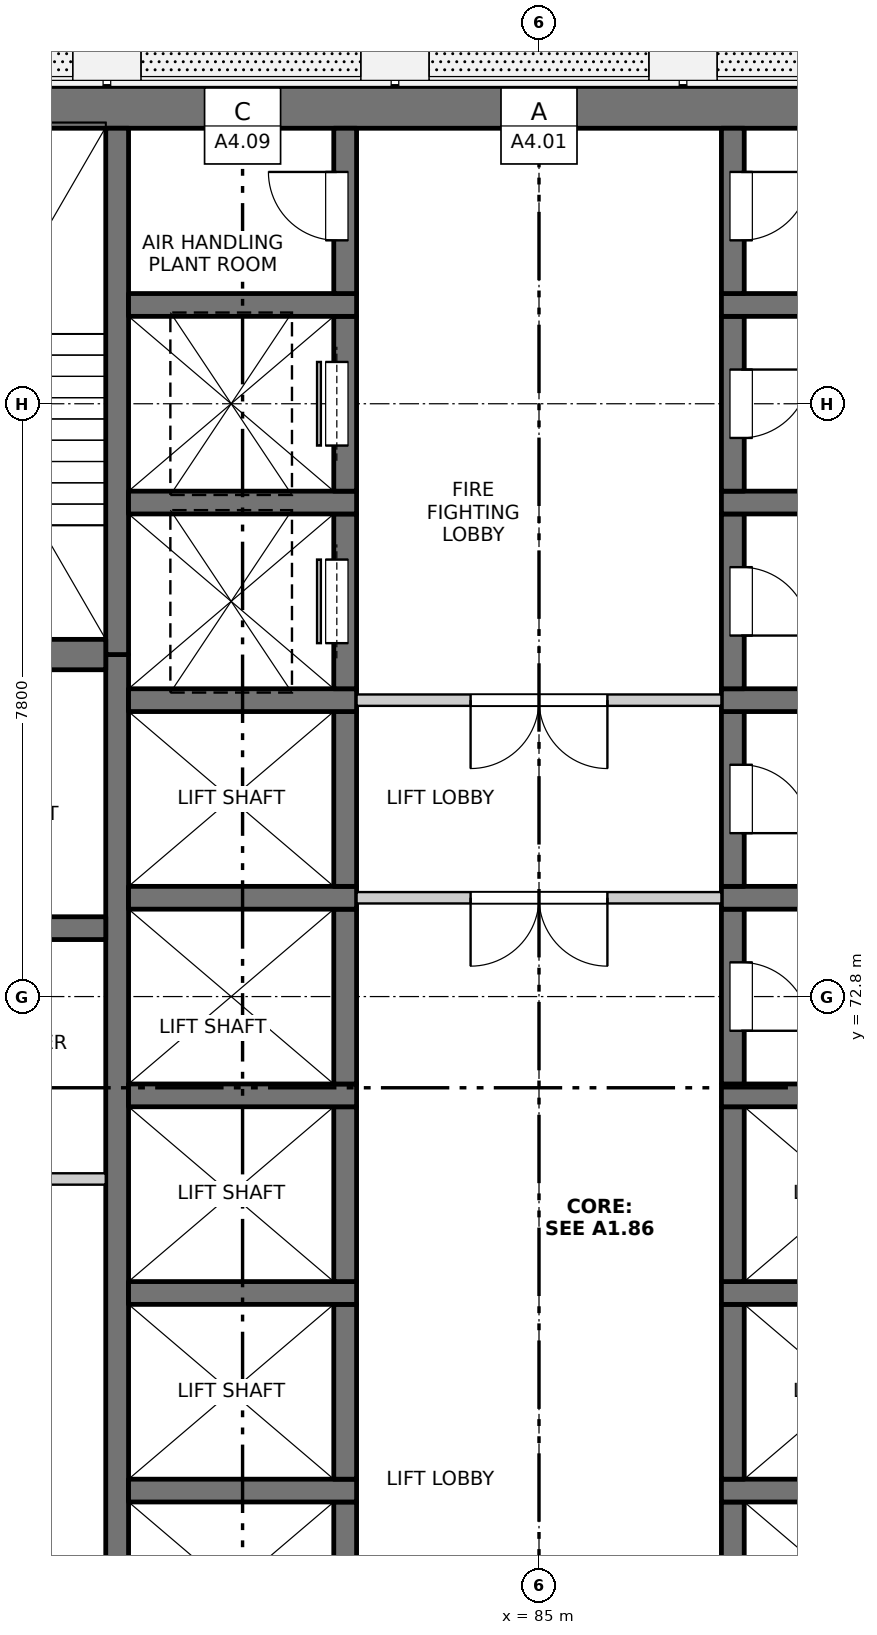
"""IFC4 building model, lengths in metres.
Left out: names, types, materials, properties, quantities, classifications, styles, units other than length and angle.
Written with IfcOpenShell. Run it as: python <this file> out.ifc"""

import sys

from ifc_helpers import new_model, si_unit, direction, frame, frame_2d, origin, place, context, subcontext, project, spatial, rectangle, extrude, element, fill, save


model = new_model("IFC4")
c1 = context("Model", 3, precision=1e-05, world=origin(), true_north=direction((0.0, 1.0)))
c2 = subcontext(c1, "Body", "Model", "MODEL_VIEW")
j1 = project(units=[si_unit("LENGTHUNIT", "METRE"), si_unit("PLANEANGLEUNIT", "RADIAN")], contexts=[c1])
p1 = place(None, origin())
s1 = spatial("IfcSite", under=j1, at=p1, CompositionType="ELEMENT")
p2 = place(p1, origin())
s2 = spatial("IfcBuilding", under=s1, at=p2, CompositionType="ELEMENT")
p3 = place(p2, frame((0.0, 0.0, 116.9)))
s3 = spatial("IfcBuildingStorey", under=s2, at=p3, CompositionType="ELEMENT", Elevation=116.9)
p4 = place(p3, frame((75.525, 84.5, -0.3), z_axis=(0.0, 0.0, 1.0), x_axis=(1.0, 0.0, 0.0)))
e1 = element("IfcWall", 1, at=p4, inside=s3, PredefinedType="SOLIDWALL", context=c2, shape_type="SweptSolid", body=[
    extrude(rectangle(XDim=18.95, YDim=0.55, at=frame_2d((9.475, 0.0))), origin(), (0.0, 0.0, 1.0), 6.8),
])
p5 = place(p3, frame((79.45, 60.95, -0.3), z_axis=(0.0, 0.0, 1.0), x_axis=(0.0, 1.0, 0.0)))
e2 = element("IfcWall", 2, at=p5, inside=s3, PredefinedType="SOLIDWALL", context=c2, shape_type="SweptSolid", body=[
    extrude(rectangle(XDim=16.35, YDim=0.3, at=frame_2d((8.175, 0.0))), origin(), (0.0, 0.0, 1.0), 6.8),
])
p6 = place(p3, frame((79.45, 77.3, -0.3), z_axis=(0.0, 0.0, 1.0), x_axis=(0.0, 1.0, 0.0)))
e3 = element("IfcWall", 3, at=p6, inside=s3, PredefinedType="SOLIDWALL", context=c2, shape_type="SweptSolid", body=[
    extrude(rectangle(XDim=6.925, YDim=0.3, at=frame_2d((3.462, 0.0))), origin(), (0.0, 0.0, 1.0), 6.8),
])
p7 = place(p3, frame((82.45, 63.85, -0.3), z_axis=(0.0, 0.0, 1.0), x_axis=(0.0, 1.0, 0.0)))
e4 = element("IfcWall", 4, at=p7, inside=s3, PredefinedType="SOLIDWALL", context=c2, shape_type="SweptSolid", body=[
    extrude(rectangle(XDim=2.3, YDim=0.3, at=frame_2d((1.15, 0.0))), origin(), (0.0, 0.0, 1.0), 6.8),
])
p8 = place(p3, frame((79.6, 66.3, -0.3), z_axis=(0.0, 0.0, 1.0), x_axis=(1.0, 0.0, 0.0)))
e5 = element("IfcWall", 5, at=p8, inside=s3, PredefinedType="SOLIDWALL", context=c2, shape_type="SweptSolid", body=[
    extrude(rectangle(XDim=3.0, YDim=0.3, at=frame_2d((1.5, 0.0))), origin(), (0.0, 0.0, 1.0), 6.8),
])
p9 = place(p3, frame((82.45, 66.45, -0.3), z_axis=(0.0, 0.0, 1.0), x_axis=(0.0, 1.0, 0.0)))
e6 = element("IfcWall", 6, at=p9, inside=s3, PredefinedType="SOLIDWALL", context=c2, shape_type="SweptSolid", body=[
    extrude(rectangle(XDim=2.3, YDim=0.3, at=frame_2d((1.15, 0.0))), origin(), (0.0, 0.0, 1.0), 6.8),
])
p10 = place(p3, frame((79.6, 68.9, -0.3), z_axis=(0.0, 0.0, 1.0), x_axis=(1.0, 0.0, 0.0)))
e7 = element("IfcWall", 7, at=p10, inside=s3, PredefinedType="SOLIDWALL", context=c2, shape_type="SweptSolid", body=[
    extrude(rectangle(XDim=3.0, YDim=0.3, at=frame_2d((1.5, 0.0))), origin(), (0.0, 0.0, 1.0), 6.8),
])
p11 = place(p3, frame((82.45, 69.05, -0.3), z_axis=(0.0, 0.0, 1.0), x_axis=(0.0, 1.0, 0.0)))
e8 = element("IfcWall", 8, at=p11, inside=s3, PredefinedType="SOLIDWALL", context=c2, shape_type="SweptSolid", body=[
    extrude(rectangle(XDim=2.3, YDim=0.3, at=frame_2d((1.15, 0.0))), origin(), (0.0, 0.0, 1.0), 6.8),
])
p12 = place(p3, frame((79.6, 71.5, -0.3), z_axis=(0.0, 0.0, 1.0), x_axis=(1.0, 0.0, 0.0)))
e9 = element("IfcWall", 9, at=p12, inside=s3, PredefinedType="SOLIDWALL", context=c2, shape_type="SweptSolid", body=[
    extrude(rectangle(XDim=3.0, YDim=0.3, at=frame_2d((1.5, 0.0))), origin(), (0.0, 0.0, 1.0), 6.8),
])
p13 = place(p3, frame((82.45, 71.65, -0.3), z_axis=(0.0, 0.0, 1.0), x_axis=(0.0, 1.0, 0.0)))
e10 = element("IfcWall", 10, at=p13, inside=s3, PredefinedType="SOLIDWALL", context=c2, shape_type="SweptSolid", body=[
    extrude(rectangle(XDim=2.3, YDim=0.3, at=frame_2d((1.15, 0.0))), origin(), (0.0, 0.0, 1.0), 6.8),
])
p14 = place(p3, frame((79.6, 74.1, -0.3), z_axis=(0.0, 0.0, 1.0), x_axis=(1.0, 0.0, 0.0)))
e11 = element("IfcWall", 11, at=p14, inside=s3, PredefinedType="SOLIDWALL", context=c2, shape_type="SweptSolid", body=[
    extrude(rectangle(XDim=3.0, YDim=0.3, at=frame_2d((1.5, 0.0))), origin(), (0.0, 0.0, 1.0), 6.8),
])
p15 = place(p3, frame((82.45, 74.25, -0.3), z_axis=(0.0, 0.0, 1.0), x_axis=(0.0, 1.0, 0.0)))
e12 = element("IfcWall", 12, at=p15, inside=s3, PredefinedType="SOLIDWALL", context=c2, shape_type="SweptSolid", body=[
    extrude(rectangle(XDim=2.3, YDim=0.3, at=frame_2d((1.15, 0.0))), origin(), (0.0, 0.0, 1.0), 6.8),
])
p16 = place(p3, frame((79.6, 76.7, -0.3), z_axis=(0.0, 0.0, 1.0), x_axis=(1.0, 0.0, 0.0)))
e13 = element("IfcWall", 13, at=p16, inside=s3, PredefinedType="SOLIDWALL", context=c2, shape_type="SweptSolid", body=[
    extrude(rectangle(XDim=3.0, YDim=0.3, at=frame_2d((1.5, 0.0))), origin(), (0.0, 0.0, 1.0), 6.8),
])
p17 = place(p3, frame((82.45, 76.85, -0.3), z_axis=(0.0, 0.0, 1.0), x_axis=(0.0, 1.0, 0.0)))
e14 = element("IfcWall", 14, at=p17, inside=s3, PredefinedType="SOLIDWALL", context=c2, shape_type="SweptSolid", body=[
    extrude(rectangle(XDim=2.3, YDim=0.3, at=frame_2d((1.15, 0.0))), origin(), (0.0, 0.0, 1.0), 6.8),
])
p18 = place(p17, frame((0.6, 0.0, 0.3)))
e15 = element("IfcOpeningElement", 15, at=p18, cuts=e14, PredefinedType="OPENING", context=c2, shape_type="SweptSolid", body=[
    extrude(rectangle(XDim=1.1, YDim=2.1, at=frame_2d((0.55, 1.05))), frame((0.0, 0.16, 0.0), z_axis=(0.0, -1.0, 0.0), x_axis=(1.0, 0.0, 0.0)), (0.0, 0.0, 1.0), 0.32),
])
p19 = place(p3, frame((79.6, 79.3, -0.3), z_axis=(0.0, 0.0, 1.0), x_axis=(1.0, 0.0, 0.0)))
e16 = element("IfcWall", 16, at=p19, inside=s3, PredefinedType="SOLIDWALL", context=c2, shape_type="SweptSolid", body=[
    extrude(rectangle(XDim=3.0, YDim=0.3, at=frame_2d((1.5, 0.0))), origin(), (0.0, 0.0, 1.0), 6.8),
])
p20 = place(p3, frame((82.45, 79.45, -0.3), z_axis=(0.0, 0.0, 1.0), x_axis=(0.0, 1.0, 0.0)))
e17 = element("IfcWall", 17, at=p20, inside=s3, PredefinedType="SOLIDWALL", context=c2, shape_type="SweptSolid", body=[
    extrude(rectangle(XDim=2.3, YDim=0.3, at=frame_2d((1.15, 0.0))), origin(), (0.0, 0.0, 1.0), 6.8),
])
p21 = place(p20, frame((0.6, 0.0, 0.3)))
e18 = element("IfcOpeningElement", 18, at=p21, cuts=e17, PredefinedType="OPENING", context=c2, shape_type="SweptSolid", body=[
    extrude(rectangle(XDim=1.1, YDim=2.1, at=frame_2d((0.55, 1.05))), frame((0.0, 0.16, 0.0), z_axis=(0.0, -1.0, 0.0), x_axis=(1.0, 0.0, 0.0)), (0.0, 0.0, 1.0), 0.32),
])
p22 = place(p3, frame((79.6, 81.9, -0.3), z_axis=(0.0, 0.0, 1.0), x_axis=(1.0, 0.0, 0.0)))
e19 = element("IfcWall", 19, at=p22, inside=s3, PredefinedType="SOLIDWALL", context=c2, shape_type="SweptSolid", body=[
    extrude(rectangle(XDim=3.0, YDim=0.3, at=frame_2d((1.5, 0.0))), origin(), (0.0, 0.0, 1.0), 6.8),
])
p23 = place(p3, frame((82.45, 82.05, -0.3), z_axis=(0.0, 0.0, 1.0), x_axis=(0.0, 1.0, 0.0)))
e20 = element("IfcWall", 20, at=p23, inside=s3, PredefinedType="SOLIDWALL", context=c2, shape_type="SweptSolid", body=[
    extrude(rectangle(XDim=2.175, YDim=0.3, at=frame_2d((1.087, 0.0))), origin(), (0.0, 0.0, 1.0), 6.8),
])
p24 = place(p23, frame((0.7, 0.0, 0.3)))
e21 = element("IfcOpeningElement", 21, at=p24, cuts=e20, PredefinedType="OPENING", context=c2, shape_type="SweptSolid", body=[
    extrude(rectangle(XDim=0.9, YDim=2.1, at=frame_2d((0.45, 1.05))), frame((0.0, 0.16, 0.0), z_axis=(0.0, -1.0, 0.0), x_axis=(1.0, 0.0, 0.0)), (0.0, 0.0, 1.0), 0.32),
])
p25 = place(p3, frame((87.55, 63.85, -0.3), z_axis=(0.0, 0.0, 1.0), x_axis=(0.0, 1.0, 0.0)))
e22 = element("IfcWall", 22, at=p25, inside=s3, PredefinedType="SOLIDWALL", context=c2, shape_type="SweptSolid", body=[
    extrude(rectangle(XDim=2.3, YDim=0.3, at=frame_2d((1.15, 0.0))), origin(), (0.0, 0.0, 1.0), 6.8),
])
p26 = place(p3, frame((87.4, 66.3, -0.3), z_axis=(0.0, 0.0, 1.0), x_axis=(1.0, 0.0, 0.0)))
e23 = element("IfcWall", 23, at=p26, inside=s3, PredefinedType="SOLIDWALL", context=c2, shape_type="SweptSolid", body=[
    extrude(rectangle(XDim=3.0, YDim=0.3, at=frame_2d((1.5, 0.0))), origin(), (0.0, 0.0, 1.0), 6.8),
])
p27 = place(p3, frame((87.55, 66.45, -0.3), z_axis=(0.0, 0.0, 1.0), x_axis=(0.0, 1.0, 0.0)))
e24 = element("IfcWall", 24, at=p27, inside=s3, PredefinedType="SOLIDWALL", context=c2, shape_type="SweptSolid", body=[
    extrude(rectangle(XDim=2.3, YDim=0.3, at=frame_2d((1.15, 0.0))), origin(), (0.0, 0.0, 1.0), 6.8),
])
p28 = place(p3, frame((87.4, 68.9, -0.3), z_axis=(0.0, 0.0, 1.0), x_axis=(1.0, 0.0, 0.0)))
e25 = element("IfcWall", 25, at=p28, inside=s3, PredefinedType="SOLIDWALL", context=c2, shape_type="SweptSolid", body=[
    extrude(rectangle(XDim=3.0, YDim=0.3, at=frame_2d((1.5, 0.0))), origin(), (0.0, 0.0, 1.0), 6.8),
])
p29 = place(p3, frame((87.55, 69.05, -0.3), z_axis=(0.0, 0.0, 1.0), x_axis=(0.0, 1.0, 0.0)))
e26 = element("IfcWall", 26, at=p29, inside=s3, PredefinedType="SOLIDWALL", context=c2, shape_type="SweptSolid", body=[
    extrude(rectangle(XDim=2.3, YDim=0.3, at=frame_2d((1.15, 0.0))), origin(), (0.0, 0.0, 1.0), 6.8),
])
p30 = place(p3, frame((87.4, 71.5, -0.3), z_axis=(0.0, 0.0, 1.0), x_axis=(1.0, 0.0, 0.0)))
e27 = element("IfcWall", 27, at=p30, inside=s3, PredefinedType="SOLIDWALL", context=c2, shape_type="SweptSolid", body=[
    extrude(rectangle(XDim=3.0, YDim=0.3, at=frame_2d((1.5, 0.0))), origin(), (0.0, 0.0, 1.0), 6.8),
])
p31 = place(p3, frame((87.55, 71.65, -0.3), z_axis=(0.0, 0.0, 1.0), x_axis=(0.0, 1.0, 0.0)))
e28 = element("IfcWall", 28, at=p31, inside=s3, PredefinedType="SOLIDWALL", context=c2, shape_type="SweptSolid", body=[
    extrude(rectangle(XDim=2.3, YDim=0.3, at=frame_2d((1.15, 0.0))), origin(), (0.0, 0.0, 1.0), 6.8),
])
p32 = place(p31, frame((0.7, 0.0, 0.3)))
e29 = element("IfcOpeningElement", 29, at=p32, cuts=e28, PredefinedType="OPENING", context=c2, shape_type="SweptSolid", body=[
    extrude(rectangle(XDim=0.9, YDim=2.1, at=frame_2d((0.45, 1.05))), frame((0.0, 0.16, 0.0), z_axis=(0.0, -1.0, 0.0), x_axis=(1.0, 0.0, 0.0)), (0.0, 0.0, 1.0), 0.32),
])
p33 = place(p3, frame((87.4, 74.1, -0.3), z_axis=(0.0, 0.0, 1.0), x_axis=(1.0, 0.0, 0.0)))
e30 = element("IfcWall", 30, at=p33, inside=s3, PredefinedType="SOLIDWALL", context=c2, shape_type="SweptSolid", body=[
    extrude(rectangle(XDim=3.0, YDim=0.3, at=frame_2d((1.5, 0.0))), origin(), (0.0, 0.0, 1.0), 6.8),
])
p34 = place(p3, frame((87.55, 74.25, -0.3), z_axis=(0.0, 0.0, 1.0), x_axis=(0.0, 1.0, 0.0)))
e31 = element("IfcWall", 31, at=p34, inside=s3, PredefinedType="SOLIDWALL", context=c2, shape_type="SweptSolid", body=[
    extrude(rectangle(XDim=2.3, YDim=0.3, at=frame_2d((1.15, 0.0))), origin(), (0.0, 0.0, 1.0), 6.8),
])
p35 = place(p34, frame((0.7, 0.0, 0.3)))
e32 = element("IfcOpeningElement", 32, at=p35, cuts=e31, PredefinedType="OPENING", context=c2, shape_type="SweptSolid", body=[
    extrude(rectangle(XDim=0.9, YDim=2.1, at=frame_2d((0.45, 1.05))), frame((0.0, 0.16, 0.0), z_axis=(0.0, -1.0, 0.0), x_axis=(1.0, 0.0, 0.0)), (0.0, 0.0, 1.0), 0.32),
])
p36 = place(p3, frame((87.4, 76.7, -0.3), z_axis=(0.0, 0.0, 1.0), x_axis=(1.0, 0.0, 0.0)))
e33 = element("IfcWall", 33, at=p36, inside=s3, PredefinedType="SOLIDWALL", context=c2, shape_type="SweptSolid", body=[
    extrude(rectangle(XDim=3.0, YDim=0.3, at=frame_2d((1.5, 0.0))), origin(), (0.0, 0.0, 1.0), 6.8),
])
p37 = place(p3, frame((87.55, 76.85, -0.3), z_axis=(0.0, 0.0, 1.0), x_axis=(0.0, 1.0, 0.0)))
e34 = element("IfcWall", 34, at=p37, inside=s3, PredefinedType="SOLIDWALL", context=c2, shape_type="SweptSolid", body=[
    extrude(rectangle(XDim=2.3, YDim=0.3, at=frame_2d((1.15, 0.0))), origin(), (0.0, 0.0, 1.0), 6.8),
])
p38 = place(p37, frame((0.7, 0.0, 0.3)))
e35 = element("IfcOpeningElement", 35, at=p38, cuts=e34, PredefinedType="OPENING", context=c2, shape_type="SweptSolid", body=[
    extrude(rectangle(XDim=0.9, YDim=2.1, at=frame_2d((0.45, 1.05))), frame((0.0, 0.16, 0.0), z_axis=(0.0, -1.0, 0.0), x_axis=(1.0, 0.0, 0.0)), (0.0, 0.0, 1.0), 0.32),
])
p39 = place(p3, frame((87.4, 79.3, -0.3), z_axis=(0.0, 0.0, 1.0), x_axis=(1.0, 0.0, 0.0)))
e36 = element("IfcWall", 36, at=p39, inside=s3, PredefinedType="SOLIDWALL", context=c2, shape_type="SweptSolid", body=[
    extrude(rectangle(XDim=3.0, YDim=0.3, at=frame_2d((1.5, 0.0))), origin(), (0.0, 0.0, 1.0), 6.8),
])
p40 = place(p3, frame((87.55, 79.45, -0.3), z_axis=(0.0, 0.0, 1.0), x_axis=(0.0, 1.0, 0.0)))
e37 = element("IfcWall", 37, at=p40, inside=s3, PredefinedType="SOLIDWALL", context=c2, shape_type="SweptSolid", body=[
    extrude(rectangle(XDim=2.3, YDim=0.3, at=frame_2d((1.15, 0.0))), origin(), (0.0, 0.0, 1.0), 6.8),
])
p41 = place(p40, frame((0.7, 0.0, 0.3)))
e38 = element("IfcOpeningElement", 38, at=p41, cuts=e37, PredefinedType="OPENING", context=c2, shape_type="SweptSolid", body=[
    extrude(rectangle(XDim=0.9, YDim=2.1, at=frame_2d((0.45, 1.05))), frame((0.0, 0.16, 0.0), z_axis=(0.0, -1.0, 0.0), x_axis=(1.0, 0.0, 0.0)), (0.0, 0.0, 1.0), 0.32),
])
p42 = place(p3, frame((87.4, 81.9, -0.3), z_axis=(0.0, 0.0, 1.0), x_axis=(1.0, 0.0, 0.0)))
e39 = element("IfcWall", 39, at=p42, inside=s3, PredefinedType="SOLIDWALL", context=c2, shape_type="SweptSolid", body=[
    extrude(rectangle(XDim=3.0, YDim=0.3, at=frame_2d((1.5, 0.0))), origin(), (0.0, 0.0, 1.0), 6.8),
])
p43 = place(p3, frame((87.55, 82.05, -0.3), z_axis=(0.0, 0.0, 1.0), x_axis=(0.0, 1.0, 0.0)))
e40 = element("IfcWall", 40, at=p43, inside=s3, PredefinedType="SOLIDWALL", context=c2, shape_type="SweptSolid", body=[
    extrude(rectangle(XDim=2.175, YDim=0.3, at=frame_2d((1.087, 0.0))), origin(), (0.0, 0.0, 1.0), 6.8),
])
p44 = place(p43, frame((0.7, 0.0, 0.3)))
e41 = element("IfcOpeningElement", 41, at=p44, cuts=e40, PredefinedType="OPENING", context=c2, shape_type="SweptSolid", body=[
    extrude(rectangle(XDim=0.9, YDim=2.1, at=frame_2d((0.45, 1.05))), frame((0.0, 0.16, 0.0), z_axis=(0.0, -1.0, 0.0), x_axis=(1.0, 0.0, 0.0)), (0.0, 0.0, 1.0), 0.32),
])
p45 = place(p3, frame((75.525, 73.7, -0.3), z_axis=(0.0, 0.0, 1.0), x_axis=(1.0, 0.0, 0.0)))
e42 = element("IfcWall", 42, at=p45, inside=s3, PredefinedType="SOLIDWALL", context=c2, shape_type="SweptSolid", body=[
    extrude(rectangle(XDim=3.775, YDim=0.3, at=frame_2d((1.888, 0.0))), origin(), (0.0, 0.0, 1.0), 6.8),
])
p46 = place(p3, frame((75.525, 77.3, -0.3), z_axis=(0.0, 0.0, 1.0), x_axis=(1.0, 0.0, 0.0)))
e43 = element("IfcWall", 43, at=p46, inside=s3, PredefinedType="SOLIDWALL", context=c2, shape_type="SweptSolid", body=[
    extrude(rectangle(XDim=3.775, YDim=0.4, at=frame_2d((1.888, 0.0))), origin(), (0.0, 0.0, 1.0), 6.8),
])
p47 = place(p3, frame((75.525, 70.4, 0.0), z_axis=(0.0, 0.0, 1.0), x_axis=(1.0, 0.0, 0.0)))
e44 = element("IfcWall", 44, at=p47, inside=s3, PredefinedType="PARTITIONING", context=c2, shape_type="SweptSolid", body=[
    extrude(rectangle(XDim=3.775, YDim=0.15, at=frame_2d((1.887, 0.0))), origin(), (0.0, 0.0, 1.0), 6.5),
])
p48 = place(p3, frame((82.6, 74.1, 0.0), z_axis=(0.0, 0.0, 1.0), x_axis=(1.0, 0.0, 0.0)))
e45 = element("IfcWall", 45, at=p48, inside=s3, PredefinedType="PARTITIONING", context=c2, shape_type="SweptSolid", body=[
    extrude(rectangle(XDim=4.8, YDim=0.15, at=frame_2d((2.4, 0.0))), origin(), (0.0, 0.0, 1.0), 6.5),
])
p49 = place(p48, frame((1.5, 0.0, 0.0)))
e46 = element("IfcOpeningElement", 46, at=p49, cuts=e45, PredefinedType="OPENING", context=c2, shape_type="SweptSolid", body=[
    extrude(rectangle(XDim=1.8, YDim=2.1, at=frame_2d((0.9, 1.05))), frame((0.0, 0.085, 0.0), z_axis=(0.0, -1.0, 0.0), x_axis=(1.0, 0.0, 0.0)), (0.0, 0.0, 1.0), 0.17),
])
p50 = place(p3, frame((82.6, 76.7, 0.0), z_axis=(0.0, 0.0, 1.0), x_axis=(1.0, 0.0, 0.0)))
e47 = element("IfcWall", 47, at=p50, inside=s3, PredefinedType="PARTITIONING", context=c2, shape_type="SweptSolid", body=[
    extrude(rectangle(XDim=4.8, YDim=0.15, at=frame_2d((2.4, 0.0))), origin(), (0.0, 0.0, 1.0), 6.5),
])
p51 = place(p50, frame((1.5, 0.0, 0.0)))
e48 = element("IfcOpeningElement", 48, at=p51, cuts=e47, PredefinedType="OPENING", context=c2, shape_type="SweptSolid", body=[
    extrude(rectangle(XDim=1.8, YDim=2.1, at=frame_2d((0.9, 1.05))), frame((0.0, 0.085, 0.0), z_axis=(0.0, -1.0, 0.0), x_axis=(1.0, 0.0, 0.0)), (0.0, 0.0, 1.0), 0.17),
])
p52 = place(p32, origin())
e49 = element("IfcDoor", 49, at=p52, inside=s3, OperationType="SINGLE_SWING_RIGHT", PredefinedType="DOOR", context=c2, shape_type="SweptSolid", body=[
    extrude(rectangle(XDim=0.9, YDim=2.1, at=frame_2d((0.45, 1.05))), frame((0.0, -0.085, 0.0), z_axis=(0.0, -1.0, 0.0), x_axis=(1.0, 0.0, 0.0)), (0.0, 0.0, 1.0), 0.05),
])
fill(e29, e49)
p53 = place(p49, origin())
e50 = element("IfcDoor", 50, at=p53, inside=s3, OperationType="DOUBLE_DOOR_SINGLE_SWING", PredefinedType="DOOR", context=c2, shape_type="SweptSolid", body=[
    extrude(rectangle(XDim=1.8, YDim=2.1, at=frame_2d((0.9, 1.05))), frame((0.0, 0.025, 0.0), z_axis=(0.0, -1.0, 0.0), x_axis=(1.0, 0.0, 0.0)), (0.0, 0.0, 1.0), 0.05),
])
fill(e46, e50)
p54 = place(p35, origin())
e51 = element("IfcDoor", 51, at=p54, inside=s3, OperationType="SINGLE_SWING_RIGHT", PredefinedType="DOOR", context=c2, shape_type="SweptSolid", body=[
    extrude(rectangle(XDim=0.9, YDim=2.1, at=frame_2d((0.45, 1.05))), frame((0.0, -0.085, 0.0), z_axis=(0.0, -1.0, 0.0), x_axis=(1.0, 0.0, 0.0)), (0.0, 0.0, 1.0), 0.05),
])
fill(e32, e51)
p55 = place(p51, origin())
e52 = element("IfcDoor", 52, at=p55, inside=s3, OperationType="DOUBLE_DOOR_SINGLE_SWING", PredefinedType="DOOR", context=c2, shape_type="SweptSolid", body=[
    extrude(rectangle(XDim=1.8, YDim=2.1, at=frame_2d((0.9, 1.05))), frame((0.0, 0.025, 0.0), z_axis=(0.0, -1.0, 0.0), x_axis=(1.0, 0.0, 0.0)), (0.0, 0.0, 1.0), 0.05),
])
fill(e48, e52)
p56 = place(p18, origin())
e53 = element("IfcDoor", 53, at=p56, inside=s3, OperationType="SLIDING_TO_LEFT", PredefinedType="DOOR", context=c2, shape_type="SweptSolid", body=[
    extrude(rectangle(XDim=1.1, YDim=2.1, at=frame_2d((0.55, 1.05))), frame((0.0, 0.135, 0.0), z_axis=(0.0, -1.0, 0.0), x_axis=(1.0, 0.0, 0.0)), (0.0, 0.0, 1.0), 0.05),
])
fill(e15, e53)
p57 = place(p38, origin())
e54 = element("IfcDoor", 54, at=p57, inside=s3, OperationType="SINGLE_SWING_RIGHT", PredefinedType="DOOR", context=c2, shape_type="SweptSolid", body=[
    extrude(rectangle(XDim=0.9, YDim=2.1, at=frame_2d((0.45, 1.05))), frame((0.0, -0.085, 0.0), z_axis=(0.0, -1.0, 0.0), x_axis=(1.0, 0.0, 0.0)), (0.0, 0.0, 1.0), 0.05),
])
fill(e35, e54)
p58 = place(p21, origin())
e55 = element("IfcDoor", 55, at=p58, inside=s3, OperationType="SLIDING_TO_LEFT", PredefinedType="DOOR", context=c2, shape_type="SweptSolid", body=[
    extrude(rectangle(XDim=1.1, YDim=2.1, at=frame_2d((0.55, 1.05))), frame((0.0, 0.135, 0.0), z_axis=(0.0, -1.0, 0.0), x_axis=(1.0, 0.0, 0.0)), (0.0, 0.0, 1.0), 0.05),
])
fill(e18, e55)
p59 = place(p41, origin())
e56 = element("IfcDoor", 56, at=p59, inside=s3, OperationType="SINGLE_SWING_LEFT", PredefinedType="DOOR", context=c2, shape_type="SweptSolid", body=[
    extrude(rectangle(XDim=0.9, YDim=2.1, at=frame_2d((0.45, 1.05))), frame((0.0, -0.085, 0.0), z_axis=(0.0, -1.0, 0.0), x_axis=(1.0, 0.0, 0.0)), (0.0, 0.0, 1.0), 0.05),
])
fill(e38, e56)
p60 = place(p24, origin())
e57 = element("IfcDoor", 57, at=p60, inside=s3, OperationType="SINGLE_SWING_RIGHT", PredefinedType="DOOR", context=c2, shape_type="SweptSolid", body=[
    extrude(rectangle(XDim=0.9, YDim=2.1, at=frame_2d((0.45, 1.05))), frame((0.0, 0.135, 0.0), z_axis=(0.0, -1.0, 0.0), x_axis=(1.0, 0.0, 0.0)), (0.0, 0.0, 1.0), 0.05),
])
fill(e21, e57)
p61 = place(p44, origin())
e58 = element("IfcDoor", 58, at=p61, inside=s3, OperationType="SINGLE_SWING_LEFT", PredefinedType="DOOR", context=c2, shape_type="SweptSolid", body=[
    extrude(rectangle(XDim=0.9, YDim=2.1, at=frame_2d((0.45, 1.05))), frame((0.0, -0.085, 0.0), z_axis=(0.0, -1.0, 0.0), x_axis=(1.0, 0.0, 0.0)), (0.0, 0.0, 1.0), 0.05),
])
fill(e41, e58)
save(model, sys.argv[1])
